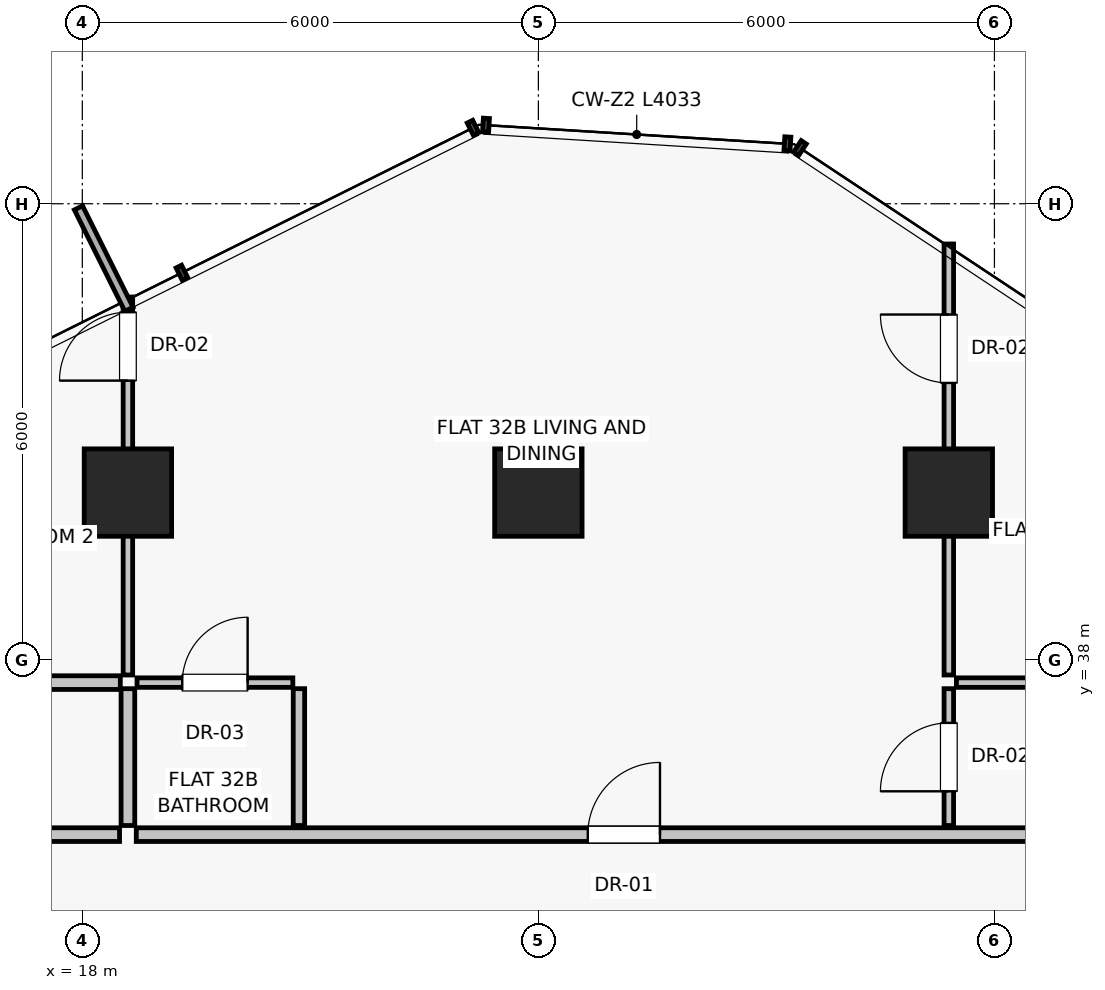
"""IFC4 building model, lengths in metres.
Left out: names, types, materials, properties, quantities, classifications, styles, units other than length and angle.
Written with IfcOpenShell. Run it as: python <this file> out.ifc"""

import sys

from ifc_helpers import new_model, si_unit, direction, frame, frame_2d, origin, origin_2d, place, context, subcontext, project, spatial, rectangle, extrude, source, transform, mapped, element, fill, save


model = new_model("IFC4")
c1 = context("Model", 3, precision=1e-05, world=origin(), true_north=direction((0.0, 1.0)))
c2 = subcontext(c1, "Body", "Model", "MODEL_VIEW")
j1 = project(units=[si_unit("LENGTHUNIT", "METRE"), si_unit("PLANEANGLEUNIT", "RADIAN")], contexts=[c1])
p1 = place(None, origin())
s1 = spatial("IfcSite", under=j1, at=p1, CompositionType="ELEMENT")
p2 = place(p1, origin())
s2 = spatial("IfcBuilding", under=s1, at=p2, CompositionType="ELEMENT")
p3 = place(p2, frame((0.0, 0.0, 116.5)))
s3 = spatial("IfcBuildingStorey", under=s2, at=p3, CompositionType="ELEMENT", Elevation=116.5)
for number, where, z_axis, x_axis in (
    (1, (29.4, 40.2, 0.0), (0.0, 0.0, 1.0), (1.0, 0.0, 0.0)),
    (2, (24.0, 40.2, 0.0), (0.0, 0.0, 1.0), (1.0, 0.0, 0.0)),
    (3, (18.6, 40.2, 0.0), (0.0, 0.0, 1.0), (1.0, 0.0, 0.0)),
):
    element("IfcColumn", number, at=place(p3, frame(where, z_axis=z_axis, x_axis=x_axis)), inside=s3, PredefinedType="COLUMN", context=c2, shape_type="SweptSolid", body=[
        extrude(rectangle(XDim=1.15, YDim=1.15, at=origin_2d()), origin(), (0.0, 0.0, 1.0), 3.25),
    ])
p4 = place(p3, frame((14.51, 35.7, 0.0), z_axis=(0.0, 0.0, 1.0), x_axis=(1.0, 0.0, 0.0)))
e4 = element("IfcWall", 4, at=p4, inside=s3, PredefinedType="PARTITIONING", context=c2, shape_type="SweptSolid", body=[
    extrude(rectangle(XDim=3.98, YDim=0.18, at=frame_2d((1.99, 0.0))), origin(), (0.0, 0.0, 1.0), 2.58),
])
p5 = place(p4, frame((1.49, 0.0, 0.0)))
e5 = element("IfcOpeningElement", 5, at=p5, cuts=e4, PredefinedType="OPENING", context=c2, shape_type="SweptSolid", body=[
    extrude(rectangle(XDim=1.0, YDim=2.01, at=frame_2d((0.5, 1.005))), frame((0.0, 0.1, 0.0), z_axis=(0.0, -1.0, 0.0), x_axis=(1.0, 0.0, 0.0)), (0.0, 0.0, 1.0), 0.2),
])
p6 = place(p3, frame((18.71, 35.7, 0.0), z_axis=(0.0, 0.0, 1.0), x_axis=(1.0, 0.0, 0.0)))
e6 = element("IfcWall", 6, at=p6, inside=s3, PredefinedType="PARTITIONING", context=c2, shape_type="SweptSolid", body=[
    extrude(rectangle(XDim=14.78, YDim=0.18, at=frame_2d((7.39, 0.0))), origin(), (0.0, 0.0, 1.0), 2.58),
])
p7 = place(p6, frame((5.94, 0.0, 0.0)))
e7 = element("IfcOpeningElement", 7, at=p7, cuts=e6, PredefinedType="OPENING", context=c2, shape_type="SweptSolid", body=[
    extrude(rectangle(XDim=0.95, YDim=2.02, at=frame_2d((0.475, 1.01))), frame((0.0, 0.1, 0.0), z_axis=(0.0, -1.0, 0.0), x_axis=(1.0, 0.0, 0.0)), (0.0, 0.0, 1.0), 0.2),
])
p8 = place(p3, frame((14.52, 37.7, 0.0), z_axis=(0.0, 0.0, 1.0), x_axis=(1.0, 0.0, 0.0)))
e8 = element("IfcWall", 8, at=p8, inside=s3, PredefinedType="PARTITIONING", context=c2, shape_type="SweptSolid", body=[
    extrude(rectangle(XDim=3.98, YDim=0.18, at=frame_2d((1.99, 0.0))), origin(), (0.0, 0.0, 1.0), 3.0),
])
p9 = place(p3, frame((18.6, 35.82, 0.0), z_axis=(0.0, 0.0, 1.0), x_axis=(0.0, 1.0, 0.0)))
e9 = element("IfcWall", 9, at=p9, inside=s3, PredefinedType="PARTITIONING", context=c2, shape_type="SweptSolid", body=[
    extrude(rectangle(XDim=1.8, YDim=0.18, at=frame_2d((0.9, 0.0))), origin(), (0.0, 0.0, 1.0), 2.378),
])
p10 = place(p3, frame((18.6, 37.8, 0.0), z_axis=(0.0, 0.0, 1.0), x_axis=(0.0, 1.0, 0.0)))
e10 = element("IfcWall", 10, at=p10, inside=s3, PredefinedType="PARTITIONING", context=c2, shape_type="SweptSolid", body=[
    extrude(rectangle(XDim=4.973, YDim=0.125, at=frame_2d((2.486, 0.0))), origin(), (0.0, 0.0, 1.0), 2.378),
])
p11 = place(p10, frame((3.873, 0.0, 0.0)))
e11 = element("IfcOpeningElement", 11, at=p11, cuts=e10, PredefinedType="OPENING", context=c2, shape_type="SweptSolid", body=[
    extrude(rectangle(XDim=0.9, YDim=2.01, at=frame_2d((0.45, 1.005))), frame((0.0, 0.073, 0.0), z_axis=(0.0, -1.0, 0.0), x_axis=(1.0, 0.0, 0.0)), (0.0, 0.0, 1.0), 0.145),
])
p12 = place(p3, frame((20.85, 35.82, 0.0), z_axis=(0.0, 0.0, 1.0), x_axis=(0.0, 1.0, 0.0)))
e12 = element("IfcWall", 12, at=p12, inside=s3, PredefinedType="PARTITIONING", context=c2, shape_type="SweptSolid", body=[
    extrude(rectangle(XDim=1.8, YDim=0.15, at=frame_2d((0.9, 0.0))), origin(), (0.0, 0.0, 1.0), 3.0),
])
p13 = place(p3, frame((18.72, 37.7, 0.0), z_axis=(0.0, 0.0, 1.0), x_axis=(1.0, 0.0, 0.0)))
e13 = element("IfcWall", 13, at=p13, inside=s3, PredefinedType="PARTITIONING", context=c2, shape_type="SweptSolid", body=[
    extrude(rectangle(XDim=2.05, YDim=0.125, at=frame_2d((1.025, 0.0))), origin(), (0.0, 0.0, 1.0), 3.0),
])
p14 = place(p13, frame((0.595, 0.0, 0.0)))
e14 = element("IfcOpeningElement", 14, at=p14, cuts=e13, PredefinedType="OPENING", context=c2, shape_type="SweptSolid", body=[
    extrude(rectangle(XDim=0.86, YDim=2.01, at=frame_2d((0.43, 1.005))), frame((0.0, 0.073, 0.0), z_axis=(0.0, -1.0, 0.0), x_axis=(1.0, 0.0, 0.0)), (0.0, 0.0, 1.0), 0.145),
])
p15 = place(p3, frame((29.4, 35.82, 0.0), z_axis=(0.0, 0.0, 1.0), x_axis=(0.0, 1.0, 0.0)))
e15 = element("IfcWall", 15, at=p15, inside=s3, PredefinedType="PARTITIONING", context=c2, shape_type="SweptSolid", body=[
    extrude(rectangle(XDim=1.8, YDim=0.125, at=frame_2d((0.9, 0.0))), origin(), (0.0, 0.0, 1.0), 2.378),
])
p16 = place(p15, frame((0.45, 0.0, 0.0)))
e16 = element("IfcOpeningElement", 16, at=p16, cuts=e15, PredefinedType="OPENING", context=c2, shape_type="SweptSolid", body=[
    extrude(rectangle(XDim=0.9, YDim=2.01, at=frame_2d((0.45, 1.005))), frame((0.0, 0.073, 0.0), z_axis=(0.0, -1.0, 0.0), x_axis=(1.0, 0.0, 0.0)), (0.0, 0.0, 1.0), 0.145),
])
p17 = place(p3, frame((29.5, 37.7, 0.0), z_axis=(0.0, 0.0, 1.0), x_axis=(1.0, 0.0, 0.0)))
e17 = element("IfcWall", 17, at=p17, inside=s3, PredefinedType="PARTITIONING", context=c2, shape_type="SweptSolid", body=[
    extrude(rectangle(XDim=3.98, YDim=0.125, at=frame_2d((1.99, 0.0))), origin(), (0.0, 0.0, 1.0), 3.0),
])
p18 = place(p3, frame((29.4, 37.8, 0.0), z_axis=(0.0, 0.0, 1.0), x_axis=(0.0, 1.0, 0.0)))
e18 = element("IfcWall", 18, at=p18, inside=s3, PredefinedType="PARTITIONING", context=c2, shape_type="SweptSolid", body=[
    extrude(rectangle(XDim=5.671, YDim=0.125, at=frame_2d((2.835, 0.0))), origin(), (0.0, 0.0, 1.0), 2.378),
])
p19 = place(p18, frame((3.842, 0.0, 0.0)))
e19 = element("IfcOpeningElement", 19, at=p19, cuts=e18, PredefinedType="OPENING", context=c2, shape_type="SweptSolid", body=[
    extrude(rectangle(XDim=0.9, YDim=2.01, at=frame_2d((0.45, 1.005))), frame((0.0, 0.073, 0.0), z_axis=(0.0, -1.0, 0.0), x_axis=(1.0, 0.0, 0.0)), (0.0, 0.0, 1.0), 0.145),
])
m1 = source(origin(), c2, "Body", "SweptSolid", [
    extrude(rectangle(XDim=0.95, YDim=2.02, at=frame_2d((0.475, 1.01))), frame((0.0, 0.025, 0.0), z_axis=(0.0, -1.0, 0.0), x_axis=(1.0, 0.0, 0.0)), (0.0, 0.0, 1.0), 0.05),
])
p20 = place(p7, origin())
e20 = element("IfcDoor", 20, at=p20, inside=s3, OperationType="SINGLE_SWING_RIGHT", PredefinedType="DOOR", context=c2, shape_type="MappedRepresentation", body=[
    mapped(m1, transform((0.0, 0.0, 0.0), scale=1.0)),
])
fill(e7, e20)
m2 = source(origin(), c2, "Body", "SweptSolid", [
    extrude(rectangle(XDim=0.9, YDim=2.01, at=frame_2d((0.45, 1.005))), frame((0.0, 0.025, 0.0), z_axis=(0.0, -1.0, 0.0), x_axis=(1.0, 0.0, 0.0)), (0.0, 0.0, 1.0), 0.05),
])
p21 = place(p11, origin())
e21 = element("IfcDoor", 21, at=p21, inside=s3, OperationType="SINGLE_SWING_LEFT", PredefinedType="DOOR", context=c2, shape_type="MappedRepresentation", body=[
    mapped(m2, transform((0.0, 0.0, 0.0), scale=1.0)),
])
fill(e11, e21)
m3 = source(origin(), c2, "Body", "SweptSolid", [
    extrude(rectangle(XDim=0.86, YDim=2.01, at=frame_2d((0.43, 1.005))), frame((0.0, 0.025, 0.0), z_axis=(0.0, -1.0, 0.0), x_axis=(1.0, 0.0, 0.0)), (0.0, 0.0, 1.0), 0.05),
])
p22 = place(p14, origin())
e22 = element("IfcDoor", 22, at=p22, inside=s3, OperationType="SINGLE_SWING_RIGHT", PredefinedType="DOOR", context=c2, shape_type="MappedRepresentation", body=[
    mapped(m3, transform((0.0, 0.0, 0.0), scale=1.0)),
])
fill(e14, e22)
p23 = place(p16, origin())
e23 = element("IfcDoor", 23, at=p23, inside=s3, OperationType="SINGLE_SWING_LEFT", PredefinedType="DOOR", context=c2, shape_type="MappedRepresentation", body=[
    mapped(m2, transform((0.0, 0.0, 0.0), scale=1.0)),
])
fill(e16, e23)
p24 = place(p19, origin())
e24 = element("IfcDoor", 24, at=p24, inside=s3, OperationType="SINGLE_SWING_RIGHT", PredefinedType="DOOR", context=c2, shape_type="MappedRepresentation", body=[
    mapped(m2, transform((0.0, 0.0, 0.0), scale=1.0)),
])
fill(e19, e24)
save(model, sys.argv[1])
